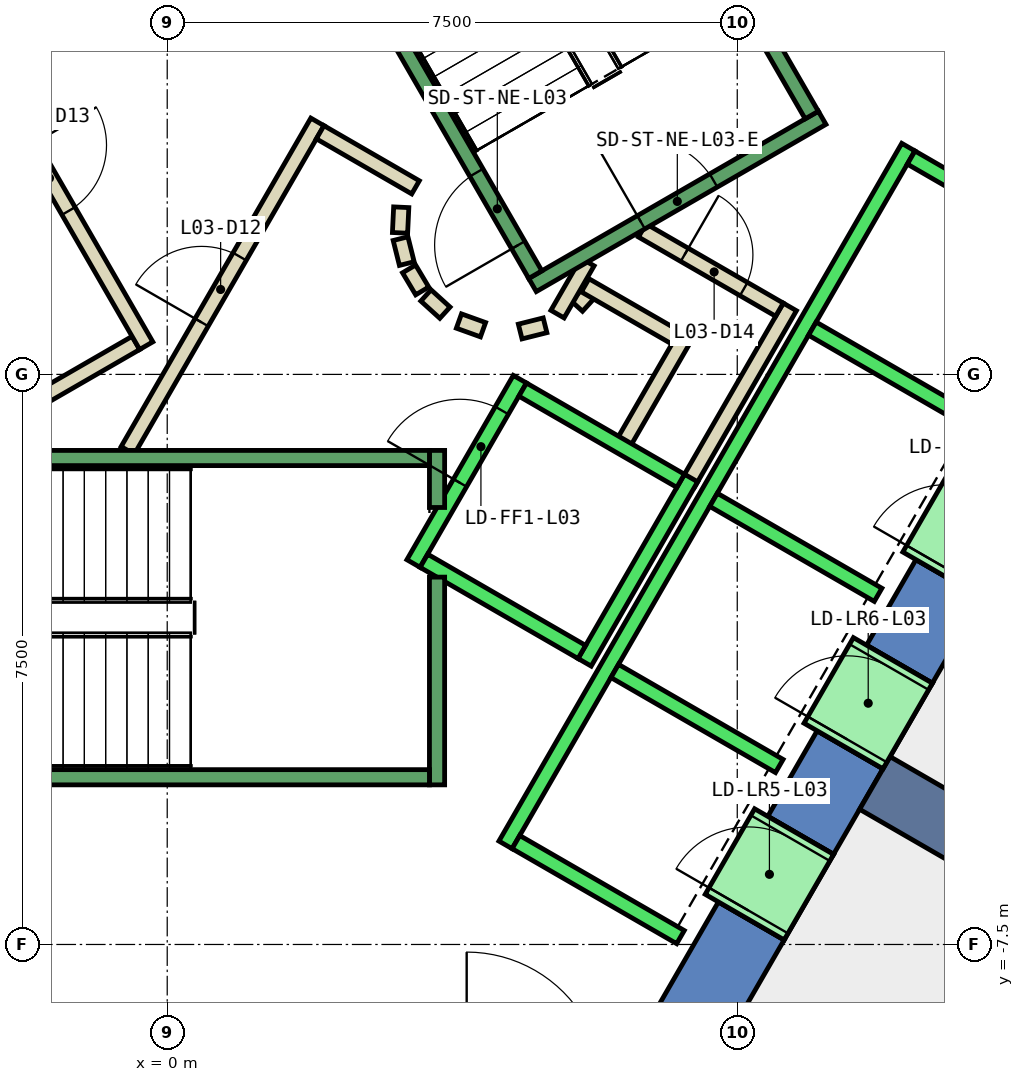
"""IFC4 building model, lengths in metres.
Left out: names, types, materials, properties, quantities, classifications, styles, units other than length and angle.
Written with IfcOpenShell. Run it as: python <this file> out.ifc"""

import sys

from ifc_helpers import new_model, si_unit, direction, frame, frame_2d, origin, place, context, subcontext, project, spatial, polyline, rectangle, outline, extrude, element, fill, save


model = new_model("IFC4")
c1 = context("Model", 3, precision=1e-05, world=origin(), true_north=direction((0.0, 1.0)))
c2 = subcontext(c1, "Body", "Model", "MODEL_VIEW")
j1 = project(units=[si_unit("LENGTHUNIT", "METRE"), si_unit("PLANEANGLEUNIT", "RADIAN")], contexts=[c1])
p1 = place(None, origin())
s1 = spatial("IfcSite", under=j1, at=p1, CompositionType="ELEMENT")
p2 = place(p1, origin())
s2 = spatial("IfcBuilding", under=s1, at=p2, CompositionType="ELEMENT")
p3 = place(p2, frame((0.0, 0.0, 20.0)))
s3 = spatial("IfcBuildingStorey", under=s2, at=p3, CompositionType="ELEMENT", Elevation=20.0)
p4 = place(p3, frame((0.0, 0.0, -0.45)))
e1 = element("IfcWall", 1, at=p4, inside=s3, PredefinedType="SHEAR", context=c2, shape_type="SweptSolid", body=[
    extrude(outline(polyline([(8.517, 11.748), (7.651, 11.248), (12.702, 2.5), (13.856, 2.5), (8.517, 11.748)])), origin(), (0.0, 0.0, 1.0), 5.0),
])
p5 = place(p3, frame((0.0, 0.0, -0.45)))
e2 = element("IfcWall", 2, at=p5, inside=s3, PredefinedType="SHEAR", context=c2, shape_type="SweptSolid", body=[
    extrude(outline(polyline([(8.117, -7.44), (7.252, -6.94), (6.351, -8.5), (6.928, -9.5), (8.117, -7.44)])), origin(), (0.0, 0.0, 1.0), 5.0),
])
p6 = place(p3, frame((0.0, 0.0, -0.45)))
e3 = element("IfcWall", 3, at=p6, inside=s3, PredefinedType="SHEAR", context=c2, shape_type="SweptSolid", body=[
    extrude(outline(polyline([(9.417, -5.189), (8.551, -4.689), (7.902, -5.814), (8.767, -6.314), (9.417, -5.189)])), origin(), (0.0, 0.0, 1.0), 5.0),
])
p7 = place(p3, frame((0.0, 0.0, -0.45)))
e4 = element("IfcWall", 4, at=p7, inside=s3, PredefinedType="SHEAR", context=c2, shape_type="SweptSolid", body=[
    extrude(outline(polyline([(10.717, -2.937), (9.851, -2.437), (9.201, -3.563), (10.067, -4.063), (10.717, -2.937)])), origin(), (0.0, 0.0, 1.0), 5.0),
])
p8 = place(p3, frame((0.0, 0.0, 3.6)))
e5 = element("IfcWall", 5, at=p8, inside=s3, PredefinedType="SHEAR", context=c2, shape_type="SweptSolid", body=[
    extrude(outline(polyline([(8.767, -6.314), (7.902, -5.814), (7.252, -6.94), (8.117, -7.44), (8.767, -6.314)])), origin(), (0.0, 0.0, 1.0), 0.95),
])
p9 = place(p3, frame((0.0, 0.0, 3.6)))
e6 = element("IfcWall", 6, at=p9, inside=s3, PredefinedType="SHEAR", context=c2, shape_type="SweptSolid", body=[
    extrude(outline(polyline([(10.067, -4.063), (9.201, -3.563), (8.551, -4.689), (9.417, -5.189), (10.067, -4.063)])), origin(), (0.0, 0.0, 1.0), 0.95),
])
p10 = place(p3, frame((0.0, 0.0, 3.6)))
e7 = element("IfcWall", 7, at=p10, inside=s3, PredefinedType="SHEAR", context=c2, shape_type="SweptSolid", body=[
    extrude(outline(polyline([(11.367, -1.811), (10.501, -1.311), (9.851, -2.437), (10.717, -2.937), (11.367, -1.811)])), origin(), (0.0, 0.0, 1.0), 0.95),
])
p11 = place(p3, frame((9.31, -5.375, -0.45), z_axis=(0.0, 0.0, 1.0), x_axis=(0.866017533419, -0.500013631625, 0.0)))
e8 = element("IfcWall", 8, at=p11, inside=s3, PredefinedType="SHEAR", context=c2, shape_type="SweptSolid", body=[
    extrude(rectangle(XDim=9.0, YDim=0.8, at=frame_2d((4.5, 0.0))), origin(), (0.0, 0.0, 1.0), 5.0),
])
p12 = place(p3, frame((5.39, 0.898, 0.0), z_axis=(0.0, 0.0, 1.0), x_axis=(0.673828488714, 0.738887791073, 0.0)))
e9 = element("IfcWall", 9, at=p12, inside=s3, PredefinedType="PARTITIONING", context=c2, shape_type="SweptSolid", body=[
    extrude(rectangle(XDim=0.263, YDim=0.2, at=frame_2d((0.131, 0.0))), origin(), (0.0, 0.0, 1.0), 4.55),
])
p13 = place(p3, frame((5.499, 1.172, 0.0), z_axis=(0.0, 0.0, 1.0), x_axis=(0.866333505267, -0.499465972466, 0.0)))
e10 = element("IfcWall", 10, at=p13, inside=s3, PredefinedType="PARTITIONING", context=c2, shape_type="SweptSolid", body=[
    extrude(rectangle(XDim=1.374, YDim=0.2, at=frame_2d((0.687, 0.0))), origin(), (0.0, 0.0, 1.0), 4.55),
])
p14 = place(p3, frame((6.826, 0.522, 0.0), z_axis=(0.0, 0.0, 1.0), x_axis=(-0.500016722714, -0.866015748706, 0.0)))
e11 = element("IfcWall", 11, at=p14, inside=s3, PredefinedType="PARTITIONING", context=c2, shape_type="SweptSolid", body=[
    extrude(rectangle(XDim=1.7, YDim=0.2, at=frame_2d((0.85, 0.0))), origin(), (0.0, 0.0, 1.0), 4.55),
])
p15 = place(p3, frame((8.192, 0.888, 0.0), z_axis=(0.0, 0.0, 1.0), x_axis=(-0.499940625693, -0.866059680843, 0.0)))
e12 = element("IfcWall", 12, at=p15, inside=s3, PredefinedType="PARTITIONING", context=c2, shape_type="SweptSolid", body=[
    extrude(rectangle(XDim=2.68, YDim=0.2, at=frame_2d((1.34, 0.0))), origin(), (0.0, 0.0, 1.0), 4.55),
])
p16 = place(p3, frame((5.135, 0.793, 0.0), z_axis=(0.0, 0.0, 1.0), x_axis=(0.499526442893, 0.866298639529, 0.0)))
e13 = element("IfcWall", 13, at=p16, inside=s3, PredefinedType="PARTITIONING", context=c2, shape_type="SweptSolid", body=[
    extrude(rectangle(XDim=0.791, YDim=0.2, at=frame_2d((0.396, 0.0))), origin(), (0.0, 0.0, 1.0), 4.55),
])
p17 = place(p3, frame((6.25, 1.894, 0.0), z_axis=(0.0, 0.0, 1.0), x_axis=(0.866043184279, -0.499969202016, 0.0)))
e14 = element("IfcWall", 14, at=p17, inside=s3, PredefinedType="PARTITIONING", context=c2, shape_type="SweptSolid", body=[
    extrude(rectangle(XDim=2.084, YDim=0.2, at=frame_2d((1.042, 0.0))), origin(), (0.0, 0.0, 1.0), 4.55),
])
p18 = place(p17, frame((0.642, 0.0, 0.0)))
e15 = element("IfcOpeningElement", 15, at=p18, cuts=e14, PredefinedType="OPENING", context=c2, shape_type="SweptSolid", body=[
    extrude(rectangle(XDim=0.9, YDim=2.1, at=frame_2d((0.45, 1.05))), frame((0.0, 0.11, 0.0), z_axis=(0.0, -1.0, 0.0), x_axis=(1.0, 0.0, 0.0)), (0.0, 0.0, 1.0), 0.22),
])
p19 = place(p3, frame((3.079, 2.199, 0.0), z_axis=(0.0, 0.0, 1.0), x_axis=(-0.047771483479, -0.998858290933, 0.0)))
e16 = element("IfcWall", 16, at=p19, inside=s3, PredefinedType="PARTITIONING", context=c2, shape_type="SweptSolid", body=[
    extrude(rectangle(XDim=0.337, YDim=0.2, at=frame_2d((0.169, 0.0))), origin(), (0.0, 0.0, 1.0), 4.55),
])
p20 = place(p3, frame((3.07, 1.786, 0.0), z_axis=(0.0, 0.0, 1.0), x_axis=(0.242705583207, -0.970099994784, 0.0)))
e17 = element("IfcWall", 17, at=p20, inside=s3, PredefinedType="PARTITIONING", context=c2, shape_type="SweptSolid", body=[
    extrude(rectangle(XDim=0.338, YDim=0.2, at=frame_2d((0.169, 0.0))), origin(), (0.0, 0.0, 1.0), 4.55),
])
for number, where, z_axis, x_axis in (
    (18, (3.182, 1.388, 0.0), (0.0, 0.0, 1.0), (0.512, -0.859, 0.0)),
    (19, (3.404, 1.039, 0.0), (0.0, 0.0, 1.0), (0.74, -0.672, 0.0)),
):
    element("IfcWall", number, at=place(p3, frame(where, z_axis=z_axis, x_axis=x_axis)), inside=s3, PredefinedType="PARTITIONING", context=c2, shape_type="SweptSolid", body=[
        extrude(rectangle(XDim=0.338, YDim=0.2, at=frame_2d((0.169, 0.0))), origin(), (0.0, 0.0, 1.0), 4.55),
    ])
p21 = place(p3, frame((3.838, 0.702, 0.0), z_axis=(0.0, 0.0, 1.0), x_axis=(0.941035081519, -0.338308993895, 0.0)))
e20 = element("IfcWall", 20, at=p21, inside=s3, PredefinedType="PARTITIONING", context=c2, shape_type="SweptSolid", body=[
    extrude(rectangle(XDim=0.337, YDim=0.2, at=frame_2d((0.168, 0.0))), origin(), (0.0, 0.0, 1.0), 4.55),
])
p22 = place(p3, frame((4.644, 0.564, 0.0), z_axis=(0.0, 0.0, 1.0), x_axis=(0.969929076366, 0.243387729394, 0.0)))
e21 = element("IfcWall", 21, at=p22, inside=s3, PredefinedType="PARTITIONING", context=c2, shape_type="SweptSolid", body=[
    extrude(rectangle(XDim=0.337, YDim=0.2, at=frame_2d((0.168, 0.0))), origin(), (0.0, 0.0, 1.0), 4.55),
])
p23 = place(p3, frame((-0.52, -1.0, 0.0), z_axis=(0.0, 0.0, 1.0), x_axis=(0.50011622646, 0.865958290007, 0.0)))
e22 = element("IfcWall", 22, at=p23, inside=s3, PredefinedType="PARTITIONING", context=c2, shape_type="SweptSolid", body=[
    extrude(rectangle(XDim=4.991, YDim=0.2, at=frame_2d((2.496, 0.0))), origin(), (0.0, 0.0, 1.0), 4.55),
])
p24 = place(p23, frame((1.945, 0.0, 0.0)))
e23 = element("IfcOpeningElement", 23, at=p24, cuts=e22, PredefinedType="OPENING", context=c2, shape_type="SweptSolid", body=[
    extrude(rectangle(XDim=1.0, YDim=2.1, at=frame_2d((0.5, 1.05))), frame((0.0, 0.11, 0.0), z_axis=(0.0, -1.0, 0.0), x_axis=(1.0, 0.0, 0.0)), (0.0, 0.0, 1.0), 0.22),
])
p25 = place(p3, frame((2.012, 3.186, 0.0), z_axis=(0.0, 0.0, 1.0), x_axis=(0.865891012941, -0.500232699559, 0.0)))
e24 = element("IfcWall", 24, at=p25, inside=s3, PredefinedType="PARTITIONING", context=c2, shape_type="SweptSolid", body=[
    extrude(rectangle(XDim=1.449, YDim=0.2, at=frame_2d((0.725, 0.0))), origin(), (0.0, 0.0, 1.0), 4.55),
])
p26 = place(p3, frame((-0.412, 0.414, 0.0), z_axis=(0.0, 0.0, 1.0), x_axis=(-0.866017369001, -0.500013916395, 0.0)))
e25 = element("IfcWall", 25, at=p26, inside=s3, PredefinedType="PARTITIONING", context=c2, shape_type="SweptSolid", body=[
    extrude(rectangle(XDim=1.45, YDim=0.2, at=frame_2d((0.725, 0.0))), origin(), (0.0, 0.0, 1.0), 4.55),
])
p27 = place(p3, frame((-2.771, 4.7, 0.0), z_axis=(0.0, 0.0, 1.0), x_axis=(0.499969479948, -0.866043023828, 0.0)))
e26 = element("IfcWall", 26, at=p27, inside=s3, PredefinedType="PARTITIONING", context=c2, shape_type="SweptSolid", body=[
    extrude(rectangle(XDim=4.99, YDim=0.2, at=frame_2d((2.495, 0.0))), origin(), (0.0, 0.0, 1.0), 4.55),
])
p28 = place(p27, frame((1.945, 0.0, 0.0)))
e27 = element("IfcOpeningElement", 27, at=p28, cuts=e26, PredefinedType="OPENING", context=c2, shape_type="SweptSolid", body=[
    extrude(rectangle(XDim=1.0, YDim=2.1, at=frame_2d((0.5, 1.05))), frame((0.0, 0.11, 0.0), z_axis=(0.0, -1.0, 0.0), x_axis=(1.0, 0.0, 0.0)), (0.0, 0.0, 1.0), 0.22),
])
p29 = place(p3, frame((3.24, -2.488, 0.0), z_axis=(0.0, 0.0, 1.0), x_axis=(0.49994636267, 0.866056369097, 0.0)))
e28 = element("IfcWall", 28, at=p29, inside=s3, PredefinedType="STANDARD", context=c2, shape_type="SweptSolid", body=[
    extrude(rectangle(XDim=2.8, YDim=0.2, at=frame_2d((1.4, 0.0))), origin(), (0.0, 0.0, 1.0), 4.55),
])
p30 = place(p29, frame((1.225, 0.0, 0.0)))
e29 = element("IfcOpeningElement", 29, at=p30, cuts=e28, PredefinedType="OPENING", context=c2, shape_type="SweptSolid", body=[
    extrude(rectangle(XDim=1.1, YDim=2.1, at=frame_2d((0.55, 1.05))), frame((0.0, 0.11, 0.0), z_axis=(0.0, -1.0, 0.0), x_axis=(1.0, 0.0, 0.0)), (0.0, 0.0, 1.0), 0.22),
])
p31 = place(p3, frame((5.492, -3.788, 0.0), z_axis=(0.0, 0.0, 1.0), x_axis=(0.500011755427, 0.866018616679, 0.0)))
e30 = element("IfcWall", 30, at=p31, inside=s3, PredefinedType="STANDARD", context=c2, shape_type="SweptSolid", body=[
    extrude(rectangle(XDim=2.8, YDim=0.2, at=frame_2d((1.4, 0.0))), origin(), (0.0, 0.0, 1.0), 4.55),
])
p32 = place(p3, frame((3.377, -2.452, 0.0), z_axis=(0.0, 0.0, 1.0), x_axis=(0.865955154139, -0.50012165622, 0.0)))
e31 = element("IfcWall", 31, at=p32, inside=s3, PredefinedType="STANDARD", context=c2, shape_type="SweptSolid", body=[
    extrude(rectangle(XDim=2.4, YDim=0.2, at=frame_2d((1.2, 0.0))), origin(), (0.0, 0.0, 1.0), 4.55),
])
p33 = place(p3, frame((4.677, -0.2, 0.0), z_axis=(0.0, 0.0, 1.0), x_axis=(0.865973769406, -0.500089422704, 0.0)))
e32 = element("IfcWall", 32, at=p33, inside=s3, PredefinedType="STANDARD", context=c2, shape_type="SweptSolid", body=[
    extrude(rectangle(XDim=2.399, YDim=0.2, at=frame_2d((1.2, 0.0))), origin(), (0.0, 0.0, 1.0), 4.55),
])
p34 = place(p3, frame((4.451, -6.19, 0.0), z_axis=(0.0, 0.0, 1.0), x_axis=(0.50000090737, 0.866024879913, 0.0)))
e33 = element("IfcWall", 33, at=p34, inside=s3, PredefinedType="STANDARD", context=c2, shape_type="SweptSolid", body=[
    extrude(rectangle(XDim=10.6, YDim=0.2, at=frame_2d((5.3, 0.0))), origin(), (0.0, 0.0, 1.0), 4.55),
])
for number, where, z_axis, x_axis in (
    (34, (4.588, -6.153, 0.0), (0.0, 0.0, 1.0), (0.866, -0.5, 0.0)),
    (35, (5.888, -3.902, 0.0), (0.0, 0.0, 1.0), (0.866, -0.5, 0.0)),
    (36, (7.188, -1.65, 0.0), (0.0, 0.0, 1.0), (0.866, -0.5, 0.0)),
    (37, (8.488, 0.602, 0.0), (0.0, 0.0, 1.0), (0.866, -0.5, 0.0)),
):
    element("IfcWall", number, at=place(p3, frame(where, z_axis=z_axis, x_axis=x_axis)), inside=s3, PredefinedType="STANDARD", context=c2, shape_type="SweptSolid", body=[
        extrude(rectangle(XDim=2.5, YDim=0.2, at=frame_2d((1.25, 0.0))), origin(), (0.0, 0.0, 1.0), 4.55),
    ])
p35 = place(p3, frame((9.788, 2.853, 0.0), z_axis=(0.0, 0.0, 1.0), x_axis=(0.865998541277, -0.500046524342, 0.0)))
e38 = element("IfcWall", 38, at=p35, inside=s3, PredefinedType="STANDARD", context=c2, shape_type="SweptSolid", body=[
    extrude(rectangle(XDim=2.5, YDim=0.2, at=frame_2d((1.25, 0.0))), origin(), (0.0, 0.0, 1.0), 4.55),
])
p36 = place(p3, frame((7.598, -7.14, 0.0), z_axis=(0.0, 0.0, 1.0), x_axis=(0.500362116554, 0.865816234728, 0.0)))
e39 = element("IfcWall", 39, at=p36, inside=s3, PredefinedType="STANDARD", context=c2, shape_type="SweptSolid", body=[
    extrude(rectangle(XDim=1.299, YDim=1.2, at=frame_2d((0.65, 0.0))), origin(), (0.0, 0.0, 1.0), 2.4),
])
p37 = place(p36, frame((0.1, 0.0, 0.0)))
e40 = element("IfcOpeningElement", 40, at=p37, cuts=e39, PredefinedType="OPENING", context=c2, shape_type="SweptSolid", body=[
    extrude(rectangle(XDim=1.1, YDim=2.3, at=frame_2d((0.55, 1.15))), frame((0.0, 0.61, 0.0), z_axis=(0.0, -1.0, 0.0), x_axis=(1.0, 0.0, 0.0)), (0.0, 0.0, 1.0), 1.22),
])
p38 = place(p3, frame((8.898, -4.889, 0.0), z_axis=(0.0, 0.0, 1.0), x_axis=(0.500036693733, 0.866004217611, 0.0)))
e41 = element("IfcWall", 41, at=p38, inside=s3, PredefinedType="STANDARD", context=c2, shape_type="SweptSolid", body=[
    extrude(rectangle(XDim=1.3, YDim=1.2, at=frame_2d((0.65, 0.0))), origin(), (0.0, 0.0, 1.0), 2.4),
])
p39 = place(p38, frame((0.1, 0.0, 0.0)))
e42 = element("IfcOpeningElement", 42, at=p39, cuts=e41, PredefinedType="OPENING", context=c2, shape_type="SweptSolid", body=[
    extrude(rectangle(XDim=1.1, YDim=2.3, at=frame_2d((0.55, 1.15))), frame((0.0, 0.61, 0.0), z_axis=(0.0, -1.0, 0.0), x_axis=(1.0, 0.0, 0.0)), (0.0, 0.0, 1.0), 1.22),
])
p40 = place(p3, frame((10.198, -2.637, 0.0), z_axis=(0.0, 0.0, 1.0), x_axis=(0.49989585183, 0.866085525409, 0.0)))
e43 = element("IfcWall", 43, at=p40, inside=s3, PredefinedType="STANDARD", context=c2, shape_type="SweptSolid", body=[
    extrude(rectangle(XDim=1.3, YDim=1.2, at=frame_2d((0.65, 0.0))), origin(), (0.0, 0.0, 1.0), 2.4),
])
p41 = place(p40, frame((0.1, 0.0, 0.0)))
e44 = element("IfcOpeningElement", 44, at=p41, cuts=e43, PredefinedType="OPENING", context=c2, shape_type="SweptSolid", body=[
    extrude(rectangle(XDim=1.1, YDim=2.3, at=frame_2d((0.55, 1.15))), frame((0.0, 0.61, 0.0), z_axis=(0.0, -1.0, 0.0), x_axis=(1.0, 0.0, 0.0)), (0.0, 0.0, 1.0), 1.22),
])
p42 = place(p3, frame((3.55, -2.667, 0.0), z_axis=(0.0, 0.0, 1.0), x_axis=(0.0, -1.0, 0.0)))
e45 = element("IfcWall", 45, at=p42, inside=s3, PredefinedType="STANDARD", context=c2, shape_type="SweptSolid", body=[
    extrude(rectangle(XDim=2.733, YDim=0.2, at=frame_2d((1.366, 0.0))), origin(), (0.0, 0.0, 1.0), 4.55),
])
p43 = place(p3, frame((3.55, -1.0, 0.0), z_axis=(0.0, 0.0, 1.0), x_axis=(0.0, -1.0, 0.0)))
e46 = element("IfcWall", 46, at=p43, inside=s3, PredefinedType="STANDARD", context=c2, shape_type="SweptSolid", body=[
    extrude(rectangle(XDim=0.751, YDim=0.2, at=frame_2d((0.375, 0.0))), origin(), (0.0, 0.0, 1.0), 4.55),
])
p44 = place(p3, frame((-3.45, -1.1, 0.0), z_axis=(0.0, 0.0, 1.0), x_axis=(1.0, 0.0, 0.0)))
e47 = element("IfcWall", 47, at=p44, inside=s3, PredefinedType="STANDARD", context=c2, shape_type="SweptSolid", body=[
    extrude(rectangle(XDim=6.9, YDim=0.2, at=frame_2d((3.45, 0.0))), origin(), (0.0, 0.0, 1.0), 4.55),
])
p45 = place(p44, frame((0.45, 0.0, 0.0)))
e48 = element("IfcOpeningElement", 48, at=p45, cuts=e47, PredefinedType="OPENING", context=c2, shape_type="SweptSolid", body=[
    extrude(rectangle(XDim=1.1, YDim=2.2, at=frame_2d((0.55, 1.1))), frame((0.0, 0.11, 0.0), z_axis=(0.0, -1.0, 0.0), x_axis=(1.0, 0.0, 0.0)), (0.0, 0.0, 1.0), 0.22),
])
p46 = place(p3, frame((-3.45, -5.3, 0.0), z_axis=(0.0, 0.0, 1.0), x_axis=(1.0, 0.0, 0.0)))
e49 = element("IfcWall", 49, at=p46, inside=s3, PredefinedType="STANDARD", context=c2, shape_type="SweptSolid", body=[
    extrude(rectangle(XDim=6.9, YDim=0.2, at=frame_2d((3.45, 0.0))), origin(), (0.0, 0.0, 1.0), 4.55),
])
p47 = place(p3, frame((4.806, 1.176, 0.0), z_axis=(0.0, 0.0, 1.0), x_axis=(0.866059941101, 0.499940174841, 0.0)))
e50 = element("IfcWall", 50, at=p47, inside=s3, PredefinedType="STANDARD", context=c2, shape_type="SweptSolid", body=[
    extrude(rectangle(XDim=4.4, YDim=0.2, at=frame_2d((2.2, 0.0))), origin(), (0.0, 0.0, 1.0), 4.55),
])
p48 = place(p47, frame((1.65, 0.0, 0.0)))
e51 = element("IfcOpeningElement", 51, at=p48, cuts=e50, PredefinedType="OPENING", context=c2, shape_type="SweptSolid", body=[
    extrude(rectangle(XDim=1.1, YDim=2.2, at=frame_2d((0.55, 1.1))), frame((0.0, 0.11, 0.0), z_axis=(0.0, -1.0, 0.0), x_axis=(1.0, 0.0, 0.0)), (0.0, 0.0, 1.0), 0.22),
])
p49 = place(p3, frame((4.843, 1.312, 0.0), z_axis=(0.0, 0.0, 1.0), x_axis=(-0.499963383562, 0.866046543262, 0.0)))
e52 = element("IfcWall", 52, at=p49, inside=s3, PredefinedType="STANDARD", context=c2, shape_type="SweptSolid", body=[
    extrude(rectangle(XDim=6.9, YDim=0.2, at=frame_2d((3.45, 0.0))), origin(), (0.0, 0.0, 1.0), 4.55),
])
p50 = place(p49, frame((0.45, 0.0, 0.0)))
e53 = element("IfcOpeningElement", 53, at=p50, cuts=e52, PredefinedType="OPENING", context=c2, shape_type="SweptSolid", body=[
    extrude(rectangle(XDim=1.1, YDim=2.2, at=frame_2d((0.55, 1.1))), frame((0.0, 0.11, 0.0), z_axis=(0.0, -1.0, 0.0), x_axis=(1.0, 0.0, 0.0)), (0.0, 0.0, 1.0), 0.22),
])
p51 = place(p3, frame((8.48, 3.412, 0.0), z_axis=(0.0, 0.0, 1.0), x_axis=(-0.499978703459, 0.866037698999, 0.0)))
e54 = element("IfcWall", 54, at=p51, inside=s3, PredefinedType="STANDARD", context=c2, shape_type="SweptSolid", body=[
    extrude(rectangle(XDim=6.9, YDim=0.2, at=frame_2d((3.45, 0.0))), origin(), (0.0, 0.0, 1.0), 4.55),
])
p52 = place(p3, frame((-1.393, 7.288, 0.0), z_axis=(0.0, 0.0, 1.0), x_axis=(-0.499963383562, -0.866046543262, 0.0)))
e55 = element("IfcWall", 55, at=p52, inside=s3, PredefinedType="STANDARD", context=c2, shape_type="SweptSolid", body=[
    extrude(rectangle(XDim=6.9, YDim=0.2, at=frame_2d((3.45, 0.0))), origin(), (0.0, 0.0, 1.0), 4.55),
])
p53 = place(p52, frame((0.45, 0.0, 0.0)))
e56 = element("IfcOpeningElement", 56, at=p53, cuts=e55, PredefinedType="OPENING", context=c2, shape_type="SweptSolid", body=[
    extrude(rectangle(XDim=1.1, YDim=2.2, at=frame_2d((0.55, 1.1))), frame((0.0, 0.11, 0.0), z_axis=(0.0, -1.0, 0.0), x_axis=(1.0, 0.0, 0.0)), (0.0, 0.0, 1.0), 0.22),
])
p54 = place(p24, origin())
e57 = element("IfcDoor", 57, at=p54, inside=s3, OperationType="SINGLE_SWING_LEFT", PredefinedType="DOOR", context=c2, shape_type="SweptSolid", body=[
    extrude(rectangle(XDim=1.0, YDim=2.1, at=frame_2d((0.5, 1.05))), frame((0.0, 0.025, 0.0), z_axis=(0.0, -1.0, 0.0), x_axis=(1.0, 0.0, 0.0)), (0.0, 0.0, 1.0), 0.05),
])
fill(e23, e57)
p55 = place(p28, origin())
e58 = element("IfcDoor", 58, at=p55, inside=s3, OperationType="SINGLE_SWING_RIGHT", PredefinedType="DOOR", context=c2, shape_type="SweptSolid", body=[
    extrude(rectangle(XDim=1.0, YDim=2.1, at=frame_2d((0.5, 1.05))), frame((0.0, 0.025, 0.0), z_axis=(0.0, -1.0, 0.0), x_axis=(1.0, 0.0, 0.0)), (0.0, 0.0, 1.0), 0.05),
])
fill(e27, e58)
p56 = place(p18, origin())
e59 = element("IfcDoor", 59, at=p56, inside=s3, OperationType="SINGLE_SWING_LEFT", PredefinedType="DOOR", context=c2, shape_type="SweptSolid", body=[
    extrude(rectangle(XDim=0.9, YDim=2.1, at=frame_2d((0.45, 1.05))), frame((0.0, 0.025, 0.0), z_axis=(0.0, -1.0, 0.0), x_axis=(1.0, 0.0, 0.0)), (0.0, 0.0, 1.0), 0.05),
])
fill(e15, e59)
p57 = place(p37, origin())
e60 = element("IfcDoor", 60, at=p57, inside=s3, OperationType="SLIDING_TO_LEFT", PredefinedType="DOOR", context=c2, shape_type="SweptSolid", body=[
    extrude(rectangle(XDim=1.1, YDim=2.3, at=frame_2d((0.55, 1.15))), frame((0.0, 0.025, 0.0), z_axis=(0.0, -1.0, 0.0), x_axis=(1.0, 0.0, 0.0)), (0.0, 0.0, 1.0), 0.05),
])
fill(e40, e60)
p58 = place(p39, origin())
e61 = element("IfcDoor", 61, at=p58, inside=s3, OperationType="SLIDING_TO_LEFT", PredefinedType="DOOR", context=c2, shape_type="SweptSolid", body=[
    extrude(rectangle(XDim=1.1, YDim=2.3, at=frame_2d((0.55, 1.15))), frame((0.0, 0.025, 0.0), z_axis=(0.0, -1.0, 0.0), x_axis=(1.0, 0.0, 0.0)), (0.0, 0.0, 1.0), 0.05),
])
fill(e42, e61)
p59 = place(p30, origin())
e62 = element("IfcDoor", 62, at=p59, inside=s3, OperationType="SLIDING_TO_LEFT", PredefinedType="DOOR", context=c2, shape_type="SweptSolid", body=[
    extrude(rectangle(XDim=1.1, YDim=2.1, at=frame_2d((0.55, 1.05))), frame((0.0, 0.025, 0.0), z_axis=(0.0, -1.0, 0.0), x_axis=(1.0, 0.0, 0.0)), (0.0, 0.0, 1.0), 0.05),
])
fill(e29, e62)
p60 = place(p50, origin())
e63 = element("IfcDoor", 63, at=p60, inside=s3, OperationType="SINGLE_SWING_LEFT", PredefinedType="DOOR", context=c2, shape_type="SweptSolid", body=[
    extrude(rectangle(XDim=1.1, YDim=2.2, at=frame_2d((0.55, 1.1))), frame((0.0, 0.025, 0.0), z_axis=(0.0, -1.0, 0.0), x_axis=(1.0, 0.0, 0.0)), (0.0, 0.0, 1.0), 0.05),
])
fill(e53, e63)
p61 = place(p48, origin())
e64 = element("IfcDoor", 64, at=p61, inside=s3, OperationType="SINGLE_SWING_LEFT", PredefinedType="DOOR", context=c2, shape_type="SweptSolid", body=[
    extrude(rectangle(XDim=1.1, YDim=2.2, at=frame_2d((0.55, 1.1))), frame((0.0, 0.025, 0.0), z_axis=(0.0, -1.0, 0.0), x_axis=(1.0, 0.0, 0.0)), (0.0, 0.0, 1.0), 0.05),
])
fill(e51, e64)
save(model, sys.argv[1])
